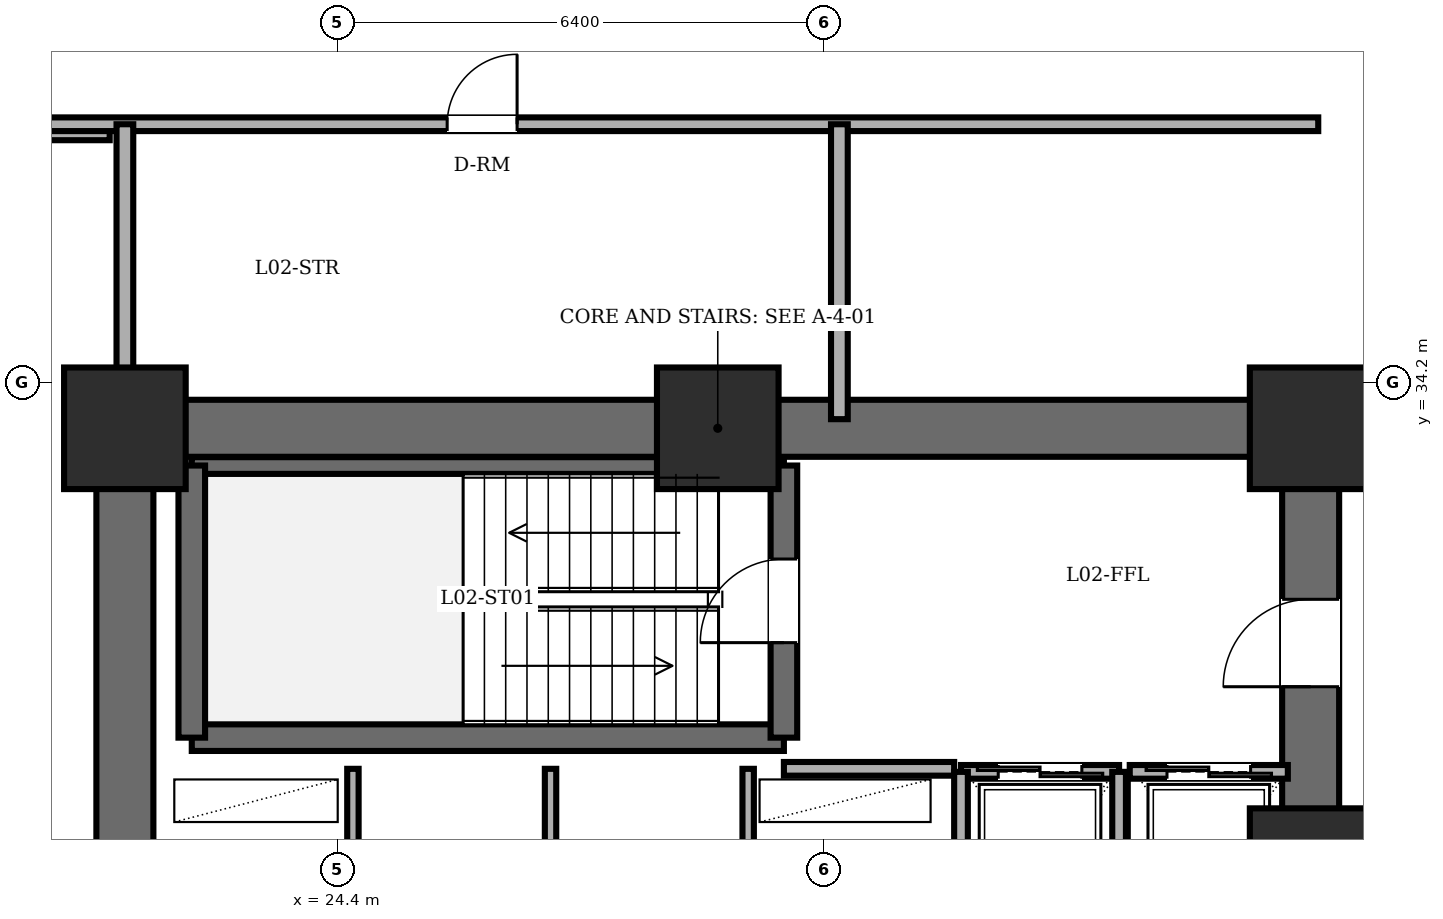
"""IFC4 building model, lengths in metres.
Left out: names, types, materials, properties, quantities, classifications, styles, units other than length and angle.
Written with IfcOpenShell. Run it as: python <this file> out.ifc"""

import sys

from ifc_helpers import new_model, si_unit, direction, frame, frame_2d, origin, origin_2d, place, context, subcontext, project, spatial, rectangle, extrude, element, fill, save


model = new_model("IFC4")
c1 = context("Model", 3, precision=1e-05, world=origin(), true_north=direction((0.0, 1.0)))
c2 = subcontext(c1, "Body", "Model", "MODEL_VIEW")
j1 = project(units=[si_unit("LENGTHUNIT", "METRE"), si_unit("PLANEANGLEUNIT", "RADIAN")], contexts=[c1])
p1 = place(None, origin())
s1 = spatial("IfcSite", under=j1, at=p1, CompositionType="ELEMENT")
p2 = place(p1, origin())
s2 = spatial("IfcBuilding", under=s1, at=p2, CompositionType="ELEMENT")
p3 = place(p2, frame((0.0, 0.0, 5.4)))
s3 = spatial("IfcBuildingStorey", under=s2, at=p3, CompositionType="ELEMENT", Elevation=5.4)
for number, where, z_axis, x_axis in (
    (1, (37.2, 27.8, 0.0), (0.0, 0.0, 1.0), (1.0, 0.0, 0.0)),
    (2, (37.2, 33.6, 0.0), (0.0, 0.0, 1.0), (1.0, 0.0, 0.0)),
    (3, (29.4, 33.6, 0.0), (0.0, 0.0, 1.0), (1.0, 0.0, 0.0)),
    (4, (21.6, 33.6, 0.0), (0.0, 0.0, 1.0), (1.0, 0.0, 0.0)),
):
    element("IfcColumn", number, at=place(p3, frame(where, z_axis=z_axis, x_axis=x_axis)), inside=s3, PredefinedType="COLUMN", context=c2, shape_type="SweptSolid", body=[
        extrude(rectangle(XDim=1.6, YDim=1.6, at=origin_2d()), origin(), (0.0, 0.0, 1.0), 4.65),
    ])
p4 = place(p3, frame((21.6, 14.4, 0.0), z_axis=(0.0, 0.0, 1.0), x_axis=(0.0, 1.0, 0.0)))
e5 = element("IfcWall", 5, at=p4, inside=s3, PredefinedType="SHEAR", context=c2, shape_type="SweptSolid", body=[
    extrude(rectangle(XDim=19.2, YDim=0.75, at=frame_2d((9.6, 0.0))), origin(), (0.0, 0.0, 1.0), 4.43),
])
p5 = place(p3, frame((21.6, 33.6, 0.0), z_axis=(0.0, 0.0, 1.0), x_axis=(1.0, 0.0, 0.0)))
e6 = element("IfcWall", 6, at=p5, inside=s3, PredefinedType="SHEAR", context=c2, shape_type="SweptSolid", body=[
    extrude(rectangle(XDim=15.6, YDim=0.75, at=frame_2d((7.8, 0.0))), origin(), (0.0, 0.0, 1.0), 4.43),
])
p6 = place(p3, frame((37.2, 14.4, 0.0), z_axis=(0.0, 0.0, 1.0), x_axis=(0.0, 1.0, 0.0)))
e7 = element("IfcWall", 7, at=p6, inside=s3, PredefinedType="SHEAR", context=c2, shape_type="SweptSolid", body=[
    extrude(rectangle(XDim=19.2, YDim=0.75, at=frame_2d((9.6, 0.0))), origin(), (0.0, 0.0, 1.0), 4.43),
])
p7 = place(p6, frame((15.8, 0.0, 0.0)))
e8 = element("IfcOpeningElement", 8, at=p7, cuts=e7, PredefinedType="OPENING", context=c2, shape_type="SweptSolid", body=[
    extrude(rectangle(XDim=1.15, YDim=2.15, at=frame_2d((0.575, 1.075))), frame((0.0, 0.385, 0.0), z_axis=(0.0, -1.0, 0.0), x_axis=(1.0, 0.0, 0.0)), (0.0, 0.0, 1.0), 0.77),
])
p8 = place(p6, frame((3.6, 0.0, 0.0)))
e9 = element("IfcOpeningElement", 9, at=p8, cuts=e7, PredefinedType="OPENING", context=c2, shape_type="SweptSolid", body=[
    extrude(rectangle(XDim=1.1, YDim=2.15, at=frame_2d((0.55, 1.075))), frame((0.0, 0.385, 0.0), z_axis=(0.0, -1.0, 0.0), x_axis=(1.0, 0.0, 0.0)), (0.0, 0.0, 1.0), 0.77),
])
p9 = place(p6, frame((8.6, 0.0, 0.0)))
e10 = element("IfcOpeningElement", 10, at=p9, cuts=e7, PredefinedType="OPENING", context=c2, shape_type="SweptSolid", body=[
    extrude(rectangle(XDim=1.3, YDim=2.2, at=frame_2d((0.65, 1.1))), frame((0.0, 0.385, 0.0), z_axis=(0.0, -1.0, 0.0), x_axis=(1.0, 0.0, 0.0)), (0.0, 0.0, 1.0), 0.77),
])
p10 = place(p3, frame((22.48, 29.53, 0.0), z_axis=(0.0, 0.0, 1.0), x_axis=(1.0, 0.0, 0.0)))
e11 = element("IfcWall", 11, at=p10, inside=s3, PredefinedType="SOLIDWALL", context=c2, shape_type="SweptSolid", body=[
    extrude(rectangle(XDim=7.79, YDim=0.35, at=frame_2d((3.895, 0.0))), origin(), (0.0, 0.0, 1.0), 4.43),
])
p11 = place(p3, frame((22.48, 33.11, 0.0), z_axis=(0.0, 0.0, 1.0), x_axis=(1.0, 0.0, 0.0)))
e12 = element("IfcWall", 12, at=p11, inside=s3, PredefinedType="PARTITIONING", context=c2, shape_type="SweptSolid", body=[
    extrude(rectangle(XDim=7.79, YDim=0.22, at=frame_2d((3.895, 0.0))), origin(), (0.0, 0.0, 1.0), 4.43),
])
p12 = place(p3, frame((22.48, 29.53, 0.0), z_axis=(0.0, 0.0, 1.0), x_axis=(0.0, 1.0, 0.0)))
e13 = element("IfcWall", 13, at=p12, inside=s3, PredefinedType="SOLIDWALL", context=c2, shape_type="SweptSolid", body=[
    extrude(rectangle(XDim=3.58, YDim=0.35, at=frame_2d((1.79, 0.0))), origin(), (0.0, 0.0, 1.0), 4.43),
])
p13 = place(p3, frame((30.27, 29.53, 0.0), z_axis=(0.0, 0.0, 1.0), x_axis=(0.0, 1.0, 0.0)))
e14 = element("IfcWall", 14, at=p13, inside=s3, PredefinedType="SOLIDWALL", context=c2, shape_type="SweptSolid", body=[
    extrude(rectangle(XDim=3.58, YDim=0.35, at=frame_2d((1.79, 0.0))), origin(), (0.0, 0.0, 1.0), 4.43),
])
p14 = place(p13, frame((1.25, 0.0, 0.0)))
e15 = element("IfcOpeningElement", 15, at=p14, cuts=e14, PredefinedType="OPENING", context=c2, shape_type="SweptSolid", body=[
    extrude(rectangle(XDim=1.1, YDim=2.15, at=frame_2d((0.55, 1.075))), frame((0.0, 0.185, 0.0), z_axis=(0.0, -1.0, 0.0), x_axis=(1.0, 0.0, 0.0)), (0.0, 0.0, 1.0), 0.37),
])
p15 = place(p3, frame((30.27, 29.12, 0.0), z_axis=(0.0, 0.0, 1.0), x_axis=(1.0, 0.0, 0.0)))
e16 = element("IfcWall", 16, at=p15, inside=s3, PredefinedType="PARTITIONING", context=c2, shape_type="SweptSolid", body=[
    extrude(rectangle(XDim=2.24, YDim=0.18, at=frame_2d((1.12, 0.0))), origin(), (0.0, 0.0, 1.0), 4.43),
])
for number, where, z_axis, x_axis in (
    (17, (24.6, 27.6, 0.0), (0.0, 0.0, 1.0), (0.0, 1.0, 0.0)),
    (18, (27.2, 27.6, 0.0), (0.0, 0.0, 1.0), (0.0, 1.0, 0.0)),
    (19, (29.8, 27.6, 0.0), (0.0, 0.0, 1.0), (0.0, 1.0, 0.0)),
):
    element("IfcWall", number, at=place(p3, frame(where, z_axis=z_axis, x_axis=x_axis)), inside=s3, PredefinedType="PARTITIONING", context=c2, shape_type="SweptSolid", body=[
        extrude(rectangle(XDim=1.52, YDim=0.15, at=frame_2d((0.76, 0.0))), origin(), (0.0, 0.0, 1.0), 4.43),
    ])
p16 = place(p3, frame((32.6, 29.08, 0.0), z_axis=(0.0, 0.0, 1.0), x_axis=(1.0, 0.0, 0.0)))
e20 = element("IfcWall", 20, at=p16, inside=s3, PredefinedType="PARTITIONING", context=c2, shape_type="SweptSolid", body=[
    extrude(rectangle(XDim=2.08, YDim=0.18, at=frame_2d((1.04, 0.0))), origin(), (0.0, 0.0, 1.0), 4.43),
])
p17 = place(p16, frame((0.49, 0.0, 0.0)))
e21 = element("IfcOpeningElement", 21, at=p17, cuts=e20, PredefinedType="OPENING", context=c2, shape_type="SweptSolid", body=[
    extrude(rectangle(XDim=1.1, YDim=2.2, at=frame_2d((0.55, 1.1))), frame((0.0, 0.1, 0.0), z_axis=(0.0, -1.0, 0.0), x_axis=(1.0, 0.0, 0.0)), (0.0, 0.0, 1.0), 0.2),
])
for number, where, z_axis, x_axis in (
    (22, (34.68, 26.35, 0.0), (0.0, 0.0, 1.0), (0.0, 1.0, 0.0)),
    (23, (32.6, 29.08, 0.0), (0.0, 0.0, 1.0), (0.0, -1.0, 0.0)),
):
    element("IfcWall", number, at=place(p3, frame(where, z_axis=z_axis, x_axis=x_axis)), inside=s3, PredefinedType="PARTITIONING", context=c2, shape_type="SweptSolid", body=[
        extrude(rectangle(XDim=2.73, YDim=0.18, at=frame_2d((1.365, 0.0))), origin(), (0.0, 0.0, 1.0), 4.43),
    ])
p18 = place(p3, frame((34.82, 29.08, 0.0), z_axis=(0.0, 0.0, 1.0), x_axis=(1.0, 0.0, 0.0)))
e24 = element("IfcWall", 24, at=p18, inside=s3, PredefinedType="PARTITIONING", context=c2, shape_type="SweptSolid", body=[
    extrude(rectangle(XDim=2.08, YDim=0.18, at=frame_2d((1.04, 0.0))), origin(), (0.0, 0.0, 1.0), 4.43),
])
p19 = place(p18, frame((0.49, 0.0, 0.0)))
e25 = element("IfcOpeningElement", 25, at=p19, cuts=e24, PredefinedType="OPENING", context=c2, shape_type="SweptSolid", body=[
    extrude(rectangle(XDim=1.1, YDim=2.2, at=frame_2d((0.55, 1.1))), frame((0.0, 0.1, 0.0), z_axis=(0.0, -1.0, 0.0), x_axis=(1.0, 0.0, 0.0)), (0.0, 0.0, 1.0), 0.2),
])
p20 = place(p3, frame((1.6, 37.5, 0.0), z_axis=(0.0, 0.0, 1.0), x_axis=(1.0, 0.0, 0.0)))
e26 = element("IfcWall", 26, at=p20, inside=s3, PredefinedType="PARTITIONING", context=c2, shape_type="SweptSolid", body=[
    extrude(rectangle(XDim=19.8, YDim=0.22, at=frame_2d((9.9, 0.0))), origin(), (0.0, 0.0, 1.0), 4.43),
])
p21 = place(p3, frame((17.85, 37.6, 0.0), z_axis=(0.0, 0.0, 1.0), x_axis=(1.0, 0.0, 0.0)))
e27 = element("IfcWall", 27, at=p21, inside=s3, PredefinedType="PARTITIONING", context=c2, shape_type="SweptSolid", body=[
    extrude(rectangle(XDim=19.45, YDim=0.18, at=frame_2d((9.725, 0.0))), origin(), (0.0, 0.0, 1.0), 4.43),
])
p22 = place(p21, frame((7.99, 0.0, 0.0)))
e28 = element("IfcOpeningElement", 28, at=p22, cuts=e27, PredefinedType="OPENING", context=c2, shape_type="SweptSolid", body=[
    extrude(rectangle(XDim=0.92, YDim=2.1, at=frame_2d((0.46, 1.05))), frame((0.0, 0.1, 0.0), z_axis=(0.0, -1.0, 0.0), x_axis=(1.0, 0.0, 0.0)), (0.0, 0.0, 1.0), 0.2),
])
p23 = place(p3, frame((21.6, 33.72, 0.0), z_axis=(0.0, 0.0, 1.0), x_axis=(0.0, 1.0, 0.0)))
e29 = element("IfcWall", 29, at=p23, inside=s3, PredefinedType="PARTITIONING", context=c2, shape_type="SweptSolid", body=[
    extrude(rectangle(XDim=3.88, YDim=0.22, at=frame_2d((1.94, 0.0))), origin(), (0.0, 0.0, 1.0), 3.612),
])
p24 = place(p3, frame((31.0, 33.72, 0.0), z_axis=(0.0, 0.0, 1.0), x_axis=(0.0, 1.0, 0.0)))
e30 = element("IfcWall", 30, at=p24, inside=s3, PredefinedType="PARTITIONING", context=c2, shape_type="SweptSolid", body=[
    extrude(rectangle(XDim=3.88, YDim=0.22, at=frame_2d((1.94, 0.0))), origin(), (0.0, 0.0, 1.0), 4.43),
])
p25 = place(p14, origin())
e31 = element("IfcDoor", 31, at=p25, inside=s3, OperationType="SINGLE_SWING_LEFT", PredefinedType="DOOR", context=c2, shape_type="SweptSolid", body=[
    extrude(rectangle(XDim=1.1, YDim=2.15, at=frame_2d((0.55, 1.075))), frame((0.0, 0.025, 0.0), z_axis=(0.0, -1.0, 0.0), x_axis=(1.0, 0.0, 0.0)), (0.0, 0.0, 1.0), 0.05),
])
fill(e15, e31)
p26 = place(p7, origin())
e32 = element("IfcDoor", 32, at=p26, inside=s3, OperationType="SINGLE_SWING_LEFT", PredefinedType="DOOR", context=c2, shape_type="SweptSolid", body=[
    extrude(rectangle(XDim=1.15, YDim=2.15, at=frame_2d((0.575, 1.075))), frame((0.0, 0.025, 0.0), z_axis=(0.0, -1.0, 0.0), x_axis=(1.0, 0.0, 0.0)), (0.0, 0.0, 1.0), 0.05),
])
fill(e8, e32)
p27 = place(p17, origin())
e33 = element("IfcDoor", 33, at=p27, inside=s3, OperationType="DOUBLE_DOOR_SLIDING", PredefinedType="DOOR", context=c2, shape_type="SweptSolid", body=[
    extrude(rectangle(XDim=1.1, YDim=2.2, at=frame_2d((0.55, 1.1))), frame((0.0, 0.025, 0.0), z_axis=(0.0, -1.0, 0.0), x_axis=(1.0, 0.0, 0.0)), (0.0, 0.0, 1.0), 0.05),
])
fill(e21, e33)
p28 = place(p19, origin())
e34 = element("IfcDoor", 34, at=p28, inside=s3, OperationType="DOUBLE_DOOR_SLIDING", PredefinedType="DOOR", context=c2, shape_type="SweptSolid", body=[
    extrude(rectangle(XDim=1.1, YDim=2.2, at=frame_2d((0.55, 1.1))), frame((0.0, 0.025, 0.0), z_axis=(0.0, -1.0, 0.0), x_axis=(1.0, 0.0, 0.0)), (0.0, 0.0, 1.0), 0.05),
])
fill(e25, e34)
p29 = place(p22, origin())
e35 = element("IfcDoor", 35, at=p29, inside=s3, OperationType="SINGLE_SWING_RIGHT", PredefinedType="DOOR", context=c2, shape_type="SweptSolid", body=[
    extrude(rectangle(XDim=0.92, YDim=2.1, at=frame_2d((0.46, 1.05))), frame((0.0, 0.025, 0.0), z_axis=(0.0, -1.0, 0.0), x_axis=(1.0, 0.0, 0.0)), (0.0, 0.0, 1.0), 0.05),
])
fill(e28, e35)
save(model, sys.argv[1])
